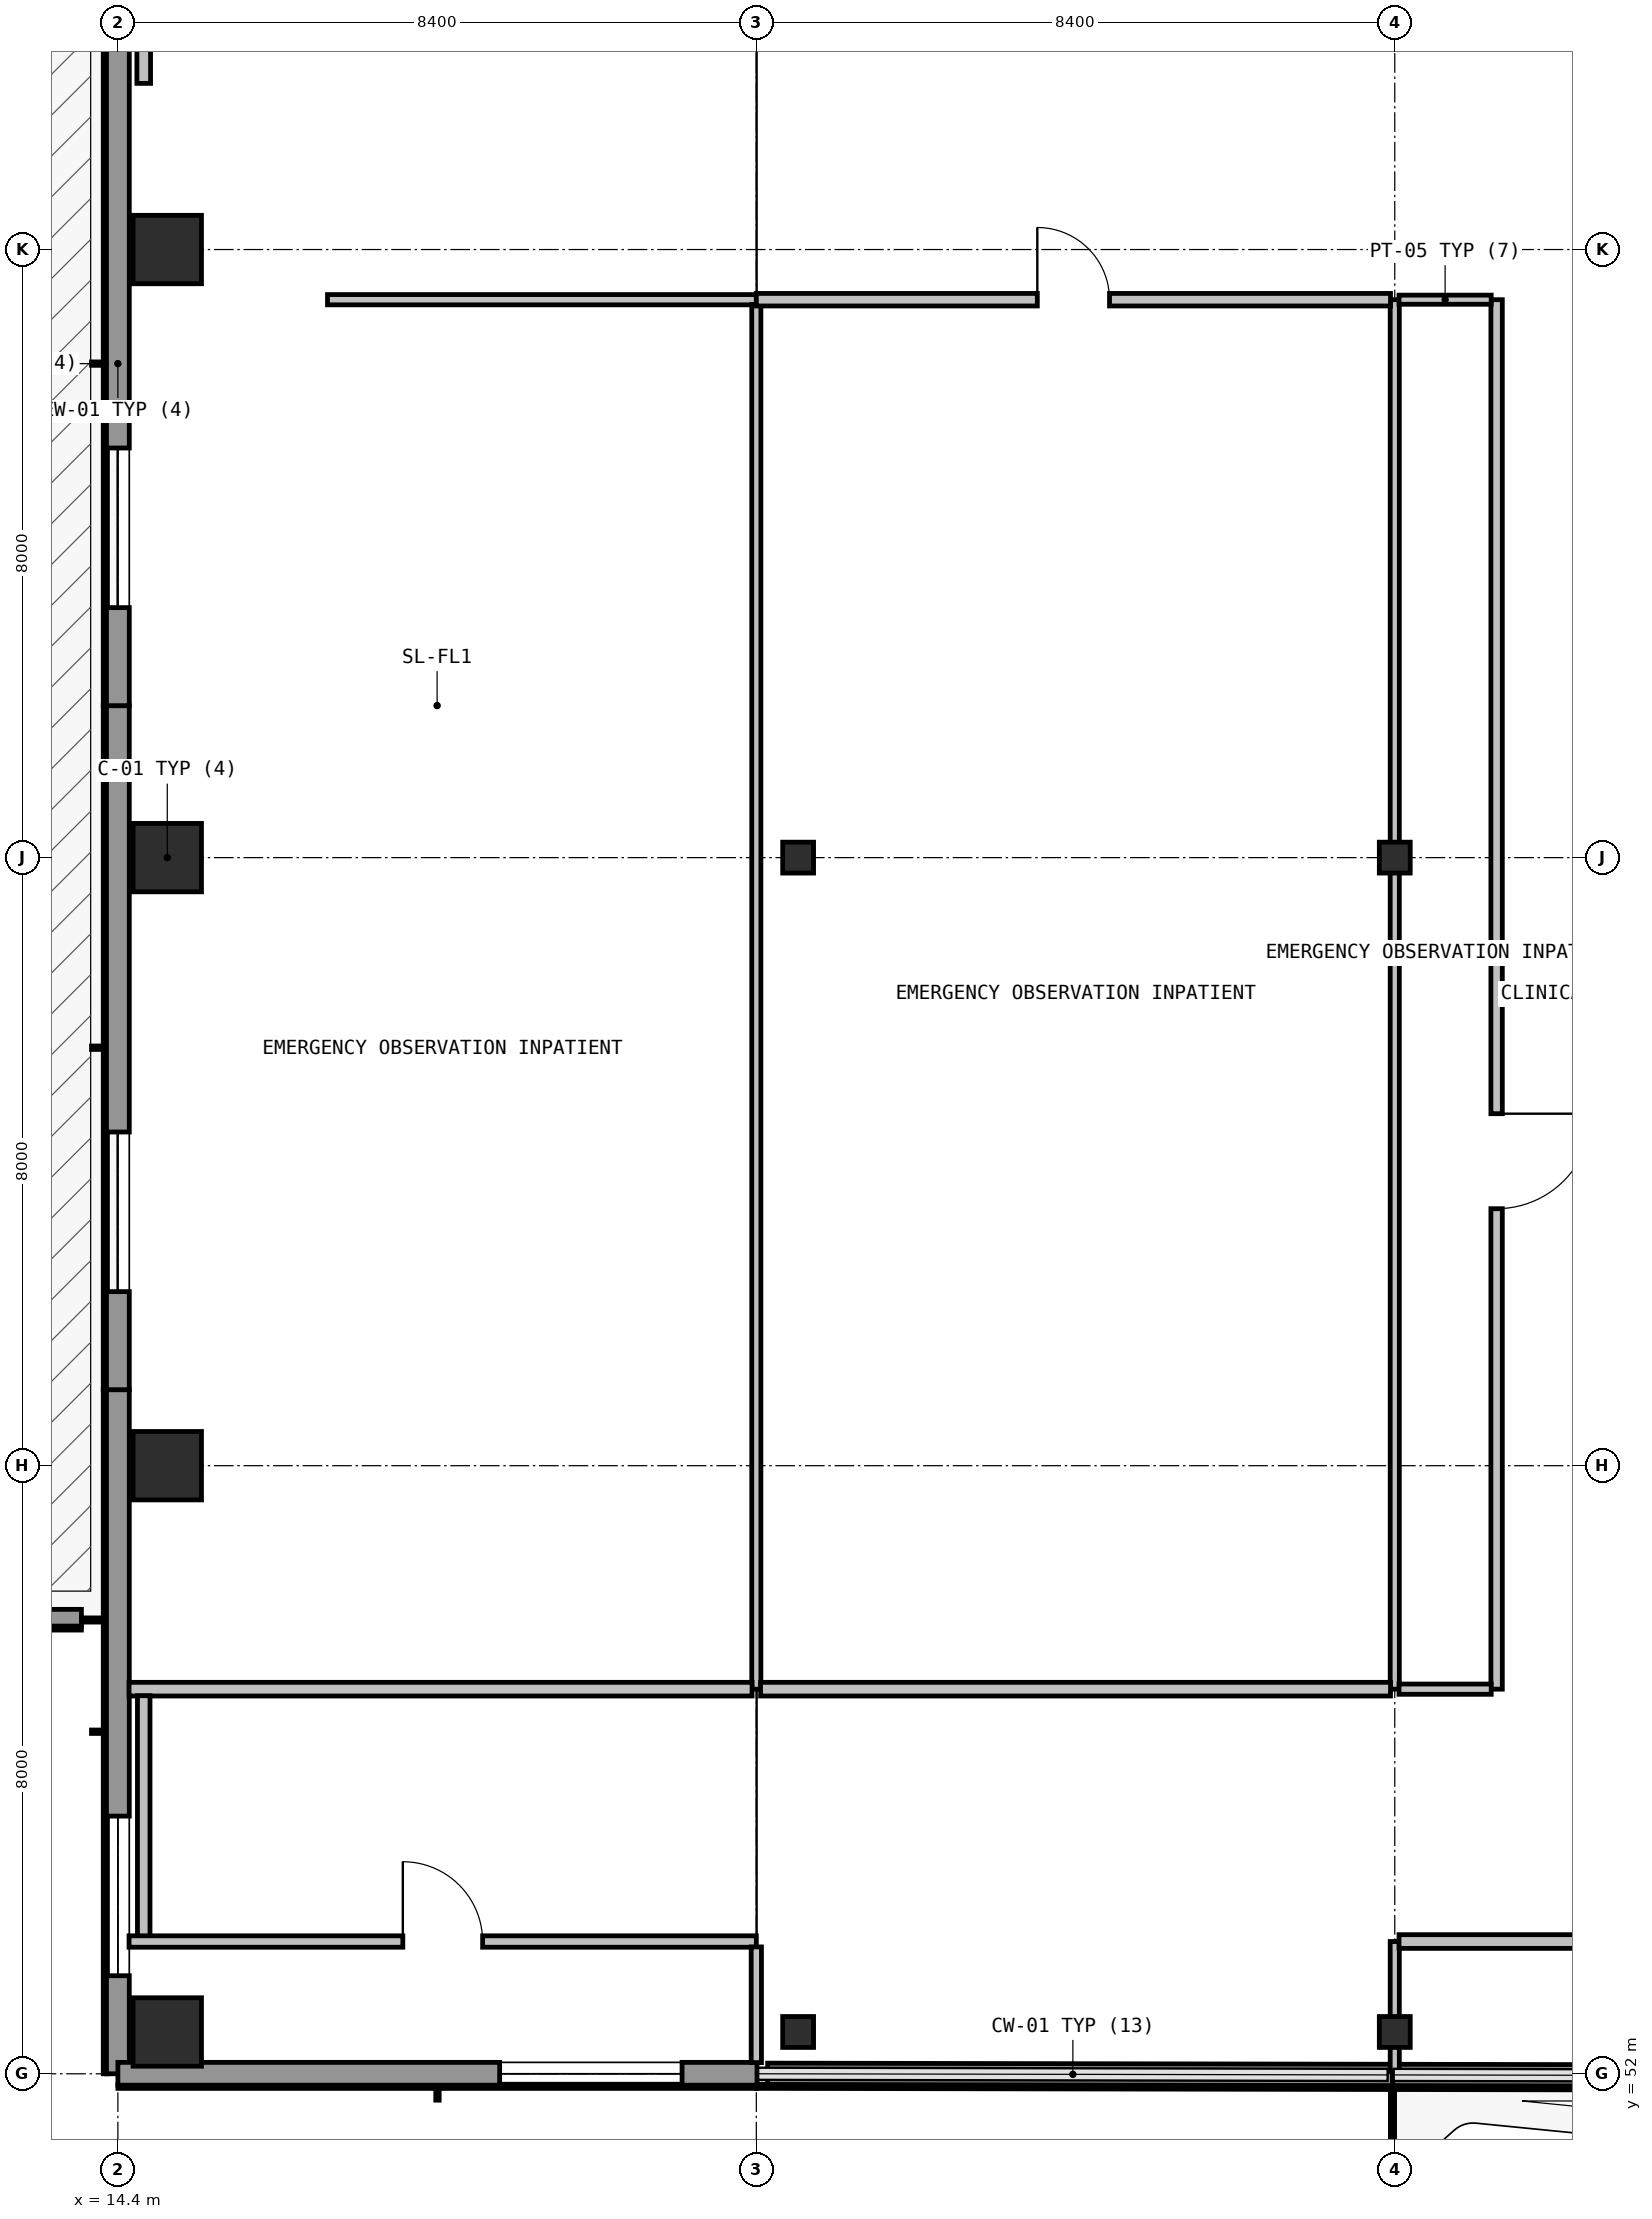
"""IFC4 building model, lengths in metres.
Left out: names, types, materials, properties, quantities, classifications, styles, units other than length and angle.
Written with IfcOpenShell. Run it as: python <this file> out.ifc"""

import sys

from ifc_helpers import new_model, si_unit, direction, frame, frame_2d, origin, origin_2d, place, context, subcontext, project, spatial, rectangle, hollow_circle, extrude, element, fill, save


model = new_model("IFC4")
c1 = context("Model", 3, precision=1e-05, world=origin(), true_north=direction((0.0, 1.0)))
c2 = subcontext(c1, "Body", "Model", "MODEL_VIEW")
j1 = project(units=[si_unit("LENGTHUNIT", "METRE"), si_unit("PLANEANGLEUNIT", "RADIAN")], contexts=[c1])
p1 = place(None, origin())
s1 = spatial("IfcSite", under=j1, at=p1, CompositionType="ELEMENT")
p2 = place(p1, origin())
s2 = spatial("IfcBuilding", under=s1, at=p2, CompositionType="ELEMENT")
p3 = place(p2, frame((0.0, 0.0, 5.4)))
s3 = spatial("IfcBuildingStorey", under=s2, at=p3, CompositionType="ELEMENT", Elevation=5.4)
for number, where, z_axis, x_axis in (
    (1, (23.35, 52.55, 0.0), (0.0, 0.0, 1.0), (1.0, 0.0, 0.0)),
    (2, (23.35, 68.0, 0.0), (0.0, 0.0, 1.0), (1.0, 0.0, 0.0)),
    (3, (31.2, 52.55, 0.0), (0.0, 0.0, 1.0), (1.0, 0.0, 0.0)),
    (4, (31.2, 68.0, 0.0), (0.0, 0.0, 1.0), (1.0, 0.0, 0.0)),
):
    element("IfcColumn", number, at=place(p3, frame(where, z_axis=z_axis, x_axis=x_axis)), inside=s3, PredefinedType="COLUMN", context=c2, shape_type="SweptSolid", body=[
        extrude(hollow_circle(Radius=0.203, WallThickness=0.016, at=origin_2d()), origin(), (0.0, 0.0, 1.0), 4.8),
    ])
for number, where, z_axis, x_axis in (
    (5, (15.05, 52.55, 0.0), (0.0, 0.0, 1.0), (1.0, 0.0, 0.0)),
    (6, (15.05, 60.0, 0.0), (0.0, 0.0, 1.0), (1.0, 0.0, 0.0)),
    (7, (15.05, 68.0, 0.0), (0.0, 0.0, 1.0), (1.0, 0.0, 0.0)),
    (8, (15.05, 76.0, 0.0), (0.0, 0.0, 1.0), (1.0, 0.0, 0.0)),
):
    element("IfcColumn", number, at=place(p3, frame(where, z_axis=z_axis, x_axis=x_axis)), inside=s3, PredefinedType="COLUMN", context=c2, shape_type="SweptSolid", body=[
        extrude(rectangle(XDim=0.9, YDim=0.9, at=origin_2d()), origin(), (0.0, 0.0, 1.0), 4.8),
    ])
p4 = place(p3, frame((14.4, 52.0, 0.0), z_axis=(0.0, 0.0, 1.0), x_axis=(0.0, 1.0, 0.0)))
e9 = element("IfcWall", 9, at=p4, inside=s3, PredefinedType="SOLIDWALL", context=c2, shape_type="SweptSolid", body=[
    extrude(rectangle(XDim=9.0, YDim=0.3, at=frame_2d((4.5, 0.0))), origin(), (0.0, 0.0, 1.0), 4.445),
])
p5 = place(p4, frame((1.29, 0.0, 0.96)))
e10 = element("IfcOpeningElement", 10, at=p5, cuts=e9, PredefinedType="OPENING", context=c2, shape_type="SweptSolid", body=[
    extrude(rectangle(XDim=2.1, YDim=1.8, at=frame_2d((1.05, 0.9))), frame((0.0, 0.16, 0.0), z_axis=(0.0, -1.0, 0.0), x_axis=(1.0, 0.0, 0.0)), (0.0, 0.0, 1.0), 0.32),
])
p6 = place(p3, frame((14.4, 61.0, 0.0), z_axis=(0.0, 0.0, 1.0), x_axis=(0.0, 1.0, 0.0)))
e11 = element("IfcWall", 11, at=p6, inside=s3, PredefinedType="SOLIDWALL", context=c2, shape_type="SweptSolid", body=[
    extrude(rectangle(XDim=8.999, YDim=0.3, at=frame_2d((4.5, 0.0))), origin(), (0.0, 0.0, 1.0), 4.445),
])
p7 = place(p6, frame((1.29, 0.0, 0.96)))
e12 = element("IfcOpeningElement", 12, at=p7, cuts=e11, PredefinedType="OPENING", context=c2, shape_type="SweptSolid", body=[
    extrude(rectangle(XDim=2.1, YDim=1.8, at=frame_2d((1.05, 0.9))), frame((0.0, 0.16, 0.0), z_axis=(0.0, -1.0, 0.0), x_axis=(1.0, 0.0, 0.0)), (0.0, 0.0, 1.0), 0.32),
])
p8 = place(p3, frame((14.4, 69.999, 0.0), z_axis=(0.0, 0.0, 1.0), x_axis=(0.0, 1.0, 0.0)))
e13 = element("IfcWall", 13, at=p8, inside=s3, PredefinedType="SOLIDWALL", context=c2, shape_type="SweptSolid", body=[
    extrude(rectangle(XDim=9.0, YDim=0.3, at=frame_2d((4.5, 0.0))), origin(), (0.0, 0.0, 1.0), 4.445),
])
p9 = place(p8, frame((1.29, 0.0, 0.96)))
e14 = element("IfcOpeningElement", 14, at=p9, cuts=e13, PredefinedType="OPENING", context=c2, shape_type="SweptSolid", body=[
    extrude(rectangle(XDim=2.1, YDim=1.8, at=frame_2d((1.05, 0.9))), frame((0.0, 0.16, 0.0), z_axis=(0.0, -1.0, 0.0), x_axis=(1.0, 0.0, 0.0)), (0.0, 0.0, 1.0), 0.32),
])
p10 = place(p3, frame((39.531, 51.97, 0.0), z_axis=(0.0, 0.0, 1.0), x_axis=(-0.999998360026, 0.001811062053, 0.0)))
e15 = element("IfcWall", 15, at=p10, inside=s3, PredefinedType="SOLIDWALL", context=c2, shape_type="SweptSolid", body=[
    extrude(rectangle(XDim=8.358, YDim=0.28, at=frame_2d((4.179, 0.0))), origin(), (0.0, 0.0, 1.0), 0.94),
])
p11 = place(p3, frame((31.169, 51.985, 0.0), z_axis=(0.0, 0.0, 1.0), x_axis=(-0.999998358775, 0.001811752647, 0.0)))
e16 = element("IfcWall", 16, at=p11, inside=s3, PredefinedType="SOLIDWALL", context=c2, shape_type="SweptSolid", body=[
    extrude(rectangle(XDim=8.22, YDim=0.28, at=frame_2d((4.11, 0.0))), origin(), (0.0, 0.0, 1.0), 0.94),
])
p12 = place(p3, frame((22.809, 52.0, 0.0), z_axis=(0.0, 0.0, 1.0), x_axis=(-1.0, 0.0, 0.0)))
e17 = element("IfcWall", 17, at=p12, inside=s3, PredefinedType="SOLIDWALL", context=c2, shape_type="SweptSolid", body=[
    extrude(rectangle(XDim=8.409, YDim=0.3, at=frame_2d((4.205, 0.0))), origin(), (0.0, 0.0, 1.0), 4.445),
])
p13 = place(p12, frame((0.986, 0.0, 0.96)))
e18 = element("IfcOpeningElement", 18, at=p13, cuts=e17, PredefinedType="OPENING", context=c2, shape_type="SweptSolid", body=[
    extrude(rectangle(XDim=2.4, YDim=1.2, at=frame_2d((1.2, 0.6))), frame((0.0, 0.16, 0.0), z_axis=(0.0, -1.0, 0.0), x_axis=(1.0, 0.0, 0.0)), (0.0, 0.0, 1.0), 0.32),
])
p14 = place(p3, frame((13.92, 58.0, -0.08), z_axis=(0.0, 0.0, 1.0), x_axis=(-1.0, 0.0, 0.0)))
e19 = element("IfcWall", 19, at=p14, inside=s3, PredefinedType="PARAPET", context=c2, shape_type="SweptSolid", body=[
    extrude(rectangle(XDim=7.92, YDim=0.22, at=frame_2d((3.96, 0.0))), origin(), (0.0, 0.0, 1.0), 1.15),
])
p15 = place(p3, frame((17.158, 75.34, 0.0), z_axis=(0.0, 0.0, 1.0), x_axis=(1.0, 0.0, 0.0)))
e20 = element("IfcWall", 20, at=p15, inside=s3, PredefinedType="PARTITIONING", context=c2, shape_type="SweptSolid", body=[
    extrude(rectangle(XDim=5.642, YDim=0.135, at=frame_2d((2.821, 0.0))), origin(), (0.0, 0.0, 1.0), 4.445),
])
p16 = place(p3, frame((22.8, 75.276, 0.0), z_axis=(0.0, 0.0, 1.0), x_axis=(0.0, -1.0, 0.0)))
e21 = element("IfcWall", 21, at=p16, inside=s3, PredefinedType="PARTITIONING", context=c2, shape_type="SweptSolid", body=[
    extrude(rectangle(XDim=18.216, YDim=0.12, at=frame_2d((9.108, 0.0))), origin(), (0.0, 0.0, 1.0), 4.445),
])
p17 = place(p3, frame((22.744, 57.06, 0.0), z_axis=(0.0, 0.0, 1.0), x_axis=(-1.0, 0.0, 0.0)))
e22 = element("IfcWall", 22, at=p17, inside=s3, PredefinedType="PARTITIONING", context=c2, shape_type="SweptSolid", body=[
    extrude(rectangle(XDim=8.197, YDim=0.18, at=frame_2d((4.098, 0.0))), origin(), (0.0, 0.0, 1.0), 4.445),
])
p18 = place(p3, frame((14.74, 56.974, 0.0), z_axis=(0.0, 0.0, 1.0), x_axis=(0.0, -1.0, 0.0)))
e23 = element("IfcWall", 23, at=p18, inside=s3, PredefinedType="PARTITIONING", context=c2, shape_type="SweptSolid", body=[
    extrude(rectangle(XDim=3.174, YDim=0.165, at=frame_2d((1.587, 0.0))), origin(), (0.0, 0.0, 1.0), 4.445),
])
p19 = place(p3, frame((14.547, 53.74, 0.0), z_axis=(0.0, 0.0, 1.0), x_axis=(1.0, 0.0, 0.0)))
e24 = element("IfcWall", 24, at=p19, inside=s3, PredefinedType="PARTITIONING", context=c2, shape_type="SweptSolid", body=[
    extrude(rectangle(XDim=8.253, YDim=0.15, at=frame_2d((4.126, 0.0))), origin(), (0.0, 0.0, 1.0), 4.445),
])
p20 = place(p19, frame((3.602, 0.0, 0.0)))
e25 = element("IfcOpeningElement", 25, at=p20, cuts=e24, PredefinedType="OPENING", context=c2, shape_type="SweptSolid", body=[
    extrude(rectangle(XDim=1.05, YDim=2.15, at=frame_2d((0.525, 1.075))), frame((0.0, 0.085, 0.0), z_axis=(0.0, -1.0, 0.0), x_axis=(1.0, 0.0, 0.0)), (0.0, 0.0, 1.0), 0.17),
])
p21 = place(p3, frame((22.8, 53.669, 0.0), z_axis=(0.0, 0.0, 1.0), x_axis=(0.0, -1.0, 0.0)))
e26 = element("IfcWall", 26, at=p21, inside=s3, PredefinedType="PARTITIONING", context=c2, shape_type="SweptSolid", body=[
    extrude(rectangle(XDim=1.522, YDim=0.135, at=frame_2d((0.761, 0.0))), origin(), (0.0, 0.0, 1.0), 4.445),
])
p22 = place(p3, frame((31.2, 75.34, 0.0), z_axis=(0.0, 0.0, 1.0), x_axis=(0.0, -1.0, 0.0)))
e27 = element("IfcWall", 27, at=p22, inside=s3, PredefinedType="PARTITIONING", context=c2, shape_type="SweptSolid", body=[
    extrude(rectangle(XDim=18.28, YDim=0.12, at=frame_2d((9.14, 0.0))), origin(), (0.0, 0.0, 1.0), 3.695),
])
p23 = place(p3, frame((31.144, 57.06, 0.0), z_axis=(0.0, 0.0, 1.0), x_axis=(-1.0, 0.0, 0.0)))
e28 = element("IfcWall", 28, at=p23, inside=s3, PredefinedType="PARTITIONING", context=c2, shape_type="SweptSolid", body=[
    extrude(rectangle(XDim=8.288, YDim=0.18, at=frame_2d((4.144, 0.0))), origin(), (0.0, 0.0, 1.0), 4.445),
])
p24 = place(p3, frame((22.8, 75.34, 0.0), z_axis=(0.0, 0.0, 1.0), x_axis=(1.0, 0.0, 0.0)))
e29 = element("IfcWall", 29, at=p24, inside=s3, PredefinedType="PARTITIONING", context=c2, shape_type="SweptSolid", body=[
    extrude(rectangle(XDim=8.344, YDim=0.165, at=frame_2d((4.172, 0.0))), origin(), (0.0, 0.0, 1.0), 4.445),
])
p25 = place(p24, frame((3.697, 0.0, 0.0)))
e30 = element("IfcOpeningElement", 30, at=p25, cuts=e29, PredefinedType="OPENING", context=c2, shape_type="SweptSolid", body=[
    extrude(rectangle(XDim=0.95, YDim=2.1, at=frame_2d((0.475, 1.05))), frame((0.0, 0.093, 0.0), z_axis=(0.0, -1.0, 0.0), x_axis=(1.0, 0.0, 0.0)), (0.0, 0.0, 1.0), 0.185),
])
p26 = place(p3, frame((31.2, 52.027, 0.0), z_axis=(0.0, 0.0, 1.0), x_axis=(0.0, 1.0, 0.0)))
e31 = element("IfcWall", 31, at=p26, inside=s3, PredefinedType="PARTITIONING", context=c2, shape_type="SweptSolid", body=[
    extrude(rectangle(XDim=1.713, YDim=0.12, at=frame_2d((0.856, 0.0))), origin(), (0.0, 0.0, 1.0), 3.695),
])
p27 = place(p3, frame((31.256, 53.74, 0.0), z_axis=(0.0, 0.0, 1.0), x_axis=(1.0, 0.0, 0.0)))
e32 = element("IfcWall", 32, at=p27, inside=s3, PredefinedType="PARTITIONING", context=c2, shape_type="SweptSolid", body=[
    extrude(rectangle(XDim=16.744, YDim=0.18, at=frame_2d((8.372, 0.0))), origin(), (0.0, 0.0, 1.0), 4.445),
])
p28 = place(p27, frame((4.013, 0.0, 0.0)))
e33 = element("IfcOpeningElement", 33, at=p28, cuts=e32, PredefinedType="OPENING", context=c2, shape_type="SweptSolid", body=[
    extrude(rectangle(XDim=1.35, YDim=2.15, at=frame_2d((0.675, 1.075))), frame((0.0, 0.1, 0.0), z_axis=(0.0, -1.0, 0.0), x_axis=(1.0, 0.0, 0.0)), (0.0, 0.0, 1.0), 0.2),
])
p29 = place(p3, frame((32.54, 75.34, 0.0), z_axis=(0.0, 0.0, 1.0), x_axis=(0.0, -1.0, 0.0)))
e34 = element("IfcWall", 34, at=p29, inside=s3, PredefinedType="PARTITIONING", context=c2, shape_type="SweptSolid", body=[
    extrude(rectangle(XDim=18.28, YDim=0.15, at=frame_2d((9.14, 0.0))), origin(), (0.0, 0.0, 1.0), 4.445),
])
p30 = place(p29, frame((10.709, 0.0, 0.0)))
e35 = element("IfcOpeningElement", 35, at=p30, cuts=e34, PredefinedType="OPENING", context=c2, shape_type="SweptSolid", body=[
    extrude(rectangle(XDim=1.25, YDim=2.15, at=frame_2d((0.625, 1.075))), frame((0.0, 0.085, 0.0), z_axis=(0.0, -1.0, 0.0), x_axis=(1.0, 0.0, 0.0)), (0.0, 0.0, 1.0), 0.17),
])
p31 = place(p3, frame((32.469, 57.06, 0.0), z_axis=(0.0, 0.0, 1.0), x_axis=(-1.0, 0.0, 0.0)))
e36 = element("IfcWall", 36, at=p31, inside=s3, PredefinedType="PARTITIONING", context=c2, shape_type="SweptSolid", body=[
    extrude(rectangle(XDim=1.213, YDim=0.135, at=frame_2d((0.606, 0.0))), origin(), (0.0, 0.0, 1.0), 4.445),
])
p32 = place(p3, frame((31.256, 75.34, 0.0), z_axis=(0.0, 0.0, 1.0), x_axis=(1.0, 0.0, 0.0)))
e37 = element("IfcWall", 37, at=p32, inside=s3, PredefinedType="PARTITIONING", context=c2, shape_type="SweptSolid", body=[
    extrude(rectangle(XDim=1.213, YDim=0.12, at=frame_2d((0.606, 0.0))), origin(), (0.0, 0.0, 1.0), 4.445),
])
p33 = place(p3, frame((14.74, 79.504, 0.0), z_axis=(0.0, 0.0, 1.0), x_axis=(0.0, -1.0, 0.0)))
e38 = element("IfcWall", 38, at=p33, inside=s3, PredefinedType="PARTITIONING", context=c2, shape_type="SweptSolid", body=[
    extrude(rectangle(XDim=1.318, YDim=0.18, at=frame_2d((0.659, 0.0))), origin(), (0.0, 0.0, 1.0), 4.445),
])
p34 = place(p5, origin())
e39 = element("IfcWindow", 39, at=p34, inside=s3, PartitioningType="SINGLE_PANEL", PredefinedType="WINDOW", context=c2, shape_type="SweptSolid", body=[
    extrude(rectangle(XDim=2.1, YDim=1.8, at=frame_2d((1.05, 0.9))), frame((0.0, 0.03, 0.0), z_axis=(0.0, -1.0, 0.0), x_axis=(1.0, 0.0, 0.0)), (0.0, 0.0, 1.0), 0.06),
])
fill(e10, e39)
p35 = place(p7, origin())
e40 = element("IfcWindow", 40, at=p35, inside=s3, PartitioningType="SINGLE_PANEL", PredefinedType="WINDOW", context=c2, shape_type="SweptSolid", body=[
    extrude(rectangle(XDim=2.1, YDim=1.8, at=frame_2d((1.05, 0.9))), frame((0.0, 0.03, 0.0), z_axis=(0.0, -1.0, 0.0), x_axis=(1.0, 0.0, 0.0)), (0.0, 0.0, 1.0), 0.06),
])
fill(e12, e40)
p36 = place(p9, origin())
e41 = element("IfcWindow", 41, at=p36, inside=s3, PartitioningType="SINGLE_PANEL", PredefinedType="WINDOW", context=c2, shape_type="SweptSolid", body=[
    extrude(rectangle(XDim=2.1, YDim=1.8, at=frame_2d((1.05, 0.9))), frame((0.0, 0.03, 0.0), z_axis=(0.0, -1.0, 0.0), x_axis=(1.0, 0.0, 0.0)), (0.0, 0.0, 1.0), 0.06),
])
fill(e14, e41)
p37 = place(p13, origin())
e42 = element("IfcWindow", 42, at=p37, inside=s3, PartitioningType="SINGLE_PANEL", PredefinedType="WINDOW", context=c2, shape_type="SweptSolid", body=[
    extrude(rectangle(XDim=2.4, YDim=1.2, at=frame_2d((1.2, 0.6))), frame((0.0, 0.03, 0.0), z_axis=(0.0, -1.0, 0.0), x_axis=(1.0, 0.0, 0.0)), (0.0, 0.0, 1.0), 0.06),
])
fill(e18, e42)
p38 = place(p20, origin())
e43 = element("IfcDoor", 43, at=p38, inside=s3, OperationType="SINGLE_SWING_RIGHT", PredefinedType="DOOR", context=c2, shape_type="SweptSolid", body=[
    extrude(rectangle(XDim=1.05, YDim=2.15, at=frame_2d((0.525, 1.075))), frame((0.0, 0.025, 0.0), z_axis=(0.0, -1.0, 0.0), x_axis=(1.0, 0.0, 0.0)), (0.0, 0.0, 1.0), 0.05),
])
fill(e25, e43)
p39 = place(p25, origin())
e44 = element("IfcDoor", 44, at=p39, inside=s3, OperationType="SINGLE_SWING_RIGHT", PredefinedType="DOOR", context=c2, shape_type="SweptSolid", body=[
    extrude(rectangle(XDim=0.95, YDim=2.1, at=frame_2d((0.475, 1.05))), frame((0.0, 0.025, 0.0), z_axis=(0.0, -1.0, 0.0), x_axis=(1.0, 0.0, 0.0)), (0.0, 0.0, 1.0), 0.05),
])
fill(e30, e44)
p40 = place(p30, origin())
e45 = element("IfcDoor", 45, at=p40, inside=s3, OperationType="SINGLE_SWING_RIGHT", PredefinedType="DOOR", context=c2, shape_type="SweptSolid", body=[
    extrude(rectangle(XDim=1.25, YDim=2.15, at=frame_2d((0.625, 1.075))), frame((0.0, 0.025, 0.0), z_axis=(0.0, -1.0, 0.0), x_axis=(1.0, 0.0, 0.0)), (0.0, 0.0, 1.0), 0.05),
])
fill(e35, e45)
save(model, sys.argv[1])
